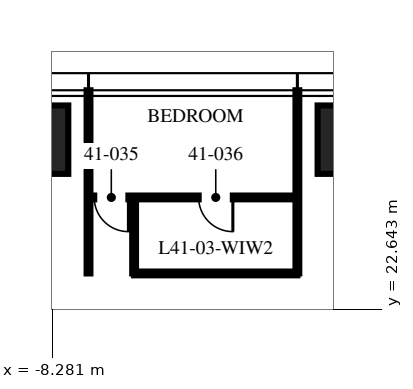
"""IFC4 building model, lengths in metres.
Left out: names, types, materials, properties, quantities, classifications, styles, units other than length and angle.
Written with IfcOpenShell. Run it as: python <this file> out.ifc"""

import sys

from ifc_helpers import new_model, si_unit, direction, frame, frame_2d, origin, origin_2d, place, context, subcontext, project, spatial, rectangle, extrude, element, fill, save


model = new_model("IFC4")
c1 = context("Model", 3, precision=1e-05, world=origin(), true_north=direction((0.0, 1.0)))
c2 = subcontext(c1, "Body", "Model", "MODEL_VIEW")
j1 = project(units=[si_unit("LENGTHUNIT", "METRE"), si_unit("PLANEANGLEUNIT", "RADIAN")], contexts=[c1])
p1 = place(None, origin())
s1 = spatial("IfcSite", under=j1, at=p1, CompositionType="ELEMENT")
p2 = place(p1, origin())
s2 = spatial("IfcBuilding", under=s1, at=p2, CompositionType="ELEMENT")
p3 = place(p2, frame((0.0, 0.0, 163.5)))
s3 = spatial("IfcBuildingStorey", under=s2, at=p3, CompositionType="ELEMENT", Elevation=163.5)
for number, where, z_axis, x_axis in (
    (1, (-9.16, 27.1, 0.0), (0.0, 0.0, 1.0), (1.0, 0.0, 0.0)),
    (2, (0.0, 27.1, 0.0), (0.0, 0.0, 1.0), (1.0, 0.0, 0.0)),
):
    element("IfcColumn", number, at=place(p3, frame(where, z_axis=z_axis, x_axis=x_axis)), inside=s3, PredefinedType="COLUMN", context=c2, shape_type="SweptSolid", body=[
        extrude(rectangle(XDim=2.6, YDim=1.8, at=origin_2d()), origin(), (0.0, 0.0, 1.0), 3.75),
    ])
for number, where, z_axis, x_axis in (
    (3, (-1.832, 23.58, 0.0), (0.0, 0.0, 1.0), (0.0, 1.0, 0.0)),
    (4, (-7.328, 23.58, 0.0), (0.0, 0.0, 1.0), (0.0, 1.0, 0.0)),
):
    element("IfcWall", number, at=place(p3, frame(where, z_axis=z_axis, x_axis=x_axis)), inside=s3, PredefinedType="PARTITIONING", context=c2, shape_type="SweptSolid", body=[
        extrude(rectangle(XDim=4.82, YDim=0.1, at=frame_2d((2.41, 0.0))), origin(), (0.0, 0.0, 1.0), 2.81),
    ])
p4 = place(p3, frame((-1.832, 25.58, 0.0), z_axis=(0.0, 0.0, 1.0), x_axis=(-1.0, 0.0, 0.0)))
e5 = element("IfcWall", 5, at=p4, inside=s3, PredefinedType="PARTITIONING", context=c2, shape_type="SweptSolid", body=[
    extrude(rectangle(XDim=5.496, YDim=0.1, at=frame_2d((2.748, 0.0))), origin(), (0.0, 0.0, 1.0), 2.81),
])
p5 = place(p4, frame((4.446, 0.0, 0.0)))
e6 = element("IfcOpeningElement", 6, at=p5, cuts=e5, PredefinedType="OPENING", context=c2, shape_type="SweptSolid", body=[
    extrude(rectangle(XDim=0.9, YDim=2.1, at=frame_2d((0.45, 1.05))), frame((0.0, 0.06, 0.0), z_axis=(0.0, -1.0, 0.0), x_axis=(1.0, 0.0, 0.0)), (0.0, 0.0, 1.0), 0.12),
])
p6 = place(p4, frame((1.698, 0.0, 0.0)))
e7 = element("IfcOpeningElement", 7, at=p6, cuts=e5, PredefinedType="OPENING", context=c2, shape_type="SweptSolid", body=[
    extrude(rectangle(XDim=0.9, YDim=2.1, at=frame_2d((0.45, 1.05))), frame((0.0, 0.06, 0.0), z_axis=(0.0, -1.0, 0.0), x_axis=(1.0, 0.0, 0.0)), (0.0, 0.0, 1.0), 0.12),
])
p7 = place(p3, frame((-6.128, 23.58, 0.0), z_axis=(0.0, 0.0, 1.0), x_axis=(0.0, 1.0, 0.0)))
e8 = element("IfcWall", 8, at=p7, inside=s3, PredefinedType="PARTITIONING", context=c2, shape_type="SweptSolid", body=[
    extrude(rectangle(XDim=2.0, YDim=0.1, at=frame_2d((1.0, 0.0))), origin(), (0.0, 0.0, 1.0), 3.5),
])
p8 = place(p3, frame((-1.832, 23.58, 0.0), z_axis=(0.0, 0.0, 1.0), x_axis=(-1.0, 0.0, 0.0)))
e9 = element("IfcWall", 9, at=p8, inside=s3, PredefinedType="PARTITIONING", context=c2, shape_type="SweptSolid", body=[
    extrude(rectangle(XDim=4.296, YDim=0.1, at=frame_2d((2.148, 0.0))), origin(), (0.0, 0.0, 1.0), 2.81),
])
p9 = place(p5, origin())
e10 = element("IfcDoor", 10, at=p9, inside=s3, OperationType="SINGLE_SWING_LEFT", PredefinedType="DOOR", context=c2, shape_type="SweptSolid", body=[
    extrude(rectangle(XDim=0.9, YDim=2.1, at=frame_2d((0.45, 1.05))), frame((0.0, 0.025, 0.0), z_axis=(0.0, -1.0, 0.0), x_axis=(1.0, 0.0, 0.0)), (0.0, 0.0, 1.0), 0.05),
])
fill(e6, e10)
p10 = place(p6, origin())
e11 = element("IfcDoor", 11, at=p10, inside=s3, OperationType="SINGLE_SWING_LEFT", PredefinedType="DOOR", context=c2, shape_type="SweptSolid", body=[
    extrude(rectangle(XDim=0.9, YDim=2.1, at=frame_2d((0.45, 1.05))), frame((0.0, 0.025, 0.0), z_axis=(0.0, -1.0, 0.0), x_axis=(1.0, 0.0, 0.0)), (0.0, 0.0, 1.0), 0.05),
])
fill(e7, e11)
save(model, sys.argv[1])
